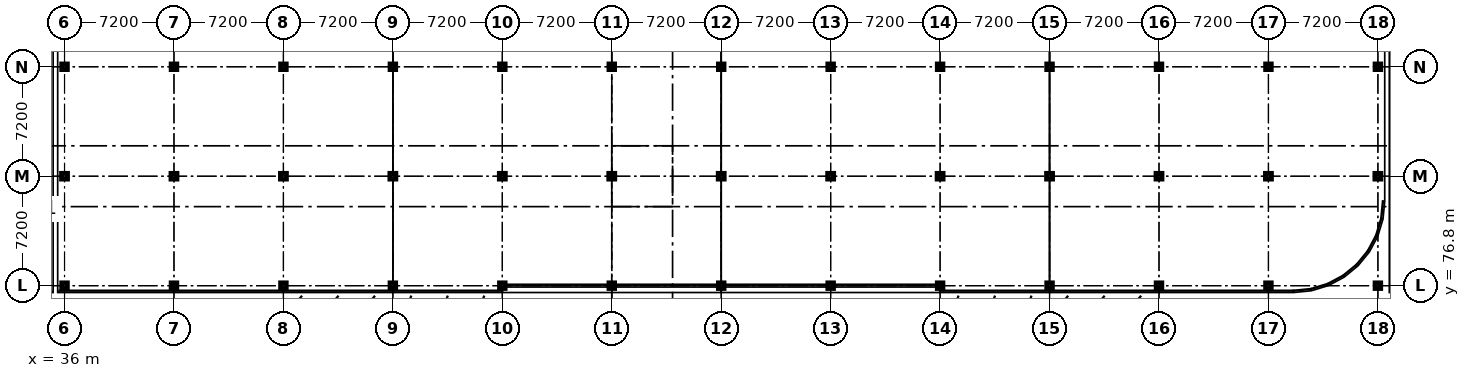
"""IFC4 building model, lengths in metres.
Left out: names, types, materials, properties, quantities, classifications, styles, units other than length and angle.
Written with IfcOpenShell. Run it as: python <this file> out.ifc"""

import sys

from ifc_helpers import new_model, si_unit, direction, frame, origin, origin_2d, place, context, subcontext, project, spatial, i_section, extrude, element, save


model = new_model("IFC4")
c1 = context("Model", 3, precision=1e-05, world=origin(), true_north=direction((0.0, 1.0)))
c2 = subcontext(c1, "Body", "Model", "MODEL_VIEW")
j1 = project(units=[si_unit("LENGTHUNIT", "METRE"), si_unit("PLANEANGLEUNIT", "RADIAN")], contexts=[c1])
p1 = place(None, origin())
s1 = spatial("IfcSite", under=j1, at=p1, CompositionType="ELEMENT")
p2 = place(p1, origin())
s2 = spatial("IfcBuilding", under=s1, at=p2, CompositionType="ELEMENT")
p3 = place(p2, frame((0.0, 0.0, 9.3)))
s3 = spatial("IfcBuildingStorey", under=s2, at=p3, CompositionType="ELEMENT", Elevation=9.3)
p4 = place(p3, frame((36.0, 76.8, 0.0), z_axis=(0.0, 0.0, 1.0), x_axis=(1.0, 0.0, 0.0)))
e1 = element("IfcColumn", 1, at=p4, inside=s3, PredefinedType="COLUMN", context=c2, shape_type="SweptSolid", body=[
    extrude(i_section(OverallWidth=0.373, OverallDepth=0.373, WebThickness=0.016, FlangeThickness=0.026, FilletRadius=0.015, at=origin_2d()), origin(), (0.0, 0.0, 1.0), 3.9),
])
p5 = place(p3, frame((36.0, 84.0, 0.0), z_axis=(0.0, 0.0, 1.0), x_axis=(1.0, 0.0, 0.0)))
e2 = element("IfcColumn", 2, at=p5, inside=s3, PredefinedType="COLUMN", context=c2, shape_type="SweptSolid", body=[
    extrude(i_section(OverallWidth=0.396, OverallDepth=0.381, WebThickness=0.019, FlangeThickness=0.03, FilletRadius=0.015, at=origin_2d()), origin(), (0.0, 0.0, 1.0), 3.9),
])
for number, where, z_axis, x_axis in (
    (3, (36.0, 91.2, 0.0), (0.0, 0.0, 1.0), (1.0, 0.0, 0.0)),
    (4, (43.2, 76.8, 0.0), (0.0, 0.0, 1.0), (1.0, 0.0, 0.0)),
):
    element("IfcColumn", number, at=place(p3, frame(where, z_axis=z_axis, x_axis=x_axis)), inside=s3, PredefinedType="COLUMN", context=c2, shape_type="SweptSolid", body=[
        extrude(i_section(OverallWidth=0.373, OverallDepth=0.373, WebThickness=0.016, FlangeThickness=0.026, FilletRadius=0.015, at=origin_2d()), origin(), (0.0, 0.0, 1.0), 3.9),
    ])
p6 = place(p3, frame((43.2, 84.0, 0.0), z_axis=(0.0, 0.0, 1.0), x_axis=(1.0, 0.0, 0.0)))
e5 = element("IfcColumn", 5, at=p6, inside=s3, PredefinedType="COLUMN", context=c2, shape_type="SweptSolid", body=[
    extrude(i_section(OverallWidth=0.396, OverallDepth=0.381, WebThickness=0.019, FlangeThickness=0.03, FilletRadius=0.015, at=origin_2d()), origin(), (0.0, 0.0, 1.0), 3.9),
])
for number, where, z_axis, x_axis in (
    (6, (43.2, 91.2, 0.0), (0.0, 0.0, 1.0), (1.0, 0.0, 0.0)),
    (7, (50.4, 76.8, 0.0), (0.0, 0.0, 1.0), (1.0, 0.0, 0.0)),
):
    element("IfcColumn", number, at=place(p3, frame(where, z_axis=z_axis, x_axis=x_axis)), inside=s3, PredefinedType="COLUMN", context=c2, shape_type="SweptSolid", body=[
        extrude(i_section(OverallWidth=0.373, OverallDepth=0.373, WebThickness=0.016, FlangeThickness=0.026, FilletRadius=0.015, at=origin_2d()), origin(), (0.0, 0.0, 1.0), 3.9),
    ])
p7 = place(p3, frame((50.4, 84.0, 0.0), z_axis=(0.0, 0.0, 1.0), x_axis=(1.0, 0.0, 0.0)))
e8 = element("IfcColumn", 8, at=p7, inside=s3, PredefinedType="COLUMN", context=c2, shape_type="SweptSolid", body=[
    extrude(i_section(OverallWidth=0.396, OverallDepth=0.381, WebThickness=0.019, FlangeThickness=0.03, FilletRadius=0.015, at=origin_2d()), origin(), (0.0, 0.0, 1.0), 3.9),
])
for number, where, z_axis, x_axis in (
    (9, (50.4, 91.2, 0.0), (0.0, 0.0, 1.0), (1.0, 0.0, 0.0)),
    (10, (57.6, 76.8, 0.0), (0.0, 0.0, 1.0), (1.0, 0.0, 0.0)),
):
    element("IfcColumn", number, at=place(p3, frame(where, z_axis=z_axis, x_axis=x_axis)), inside=s3, PredefinedType="COLUMN", context=c2, shape_type="SweptSolid", body=[
        extrude(i_section(OverallWidth=0.373, OverallDepth=0.373, WebThickness=0.016, FlangeThickness=0.026, FilletRadius=0.015, at=origin_2d()), origin(), (0.0, 0.0, 1.0), 3.9),
    ])
p8 = place(p3, frame((57.6, 84.0, 0.0), z_axis=(0.0, 0.0, 1.0), x_axis=(1.0, 0.0, 0.0)))
e11 = element("IfcColumn", 11, at=p8, inside=s3, PredefinedType="COLUMN", context=c2, shape_type="SweptSolid", body=[
    extrude(i_section(OverallWidth=0.396, OverallDepth=0.381, WebThickness=0.019, FlangeThickness=0.03, FilletRadius=0.015, at=origin_2d()), origin(), (0.0, 0.0, 1.0), 3.9),
])
for number, where, z_axis, x_axis in (
    (12, (57.6, 91.2, 0.0), (0.0, 0.0, 1.0), (1.0, 0.0, 0.0)),
    (13, (64.8, 76.8, 0.0), (0.0, 0.0, 1.0), (1.0, 0.0, 0.0)),
):
    element("IfcColumn", number, at=place(p3, frame(where, z_axis=z_axis, x_axis=x_axis)), inside=s3, PredefinedType="COLUMN", context=c2, shape_type="SweptSolid", body=[
        extrude(i_section(OverallWidth=0.373, OverallDepth=0.373, WebThickness=0.016, FlangeThickness=0.026, FilletRadius=0.015, at=origin_2d()), origin(), (0.0, 0.0, 1.0), 3.9),
    ])
p9 = place(p3, frame((64.8, 84.0, 0.0), z_axis=(0.0, 0.0, 1.0), x_axis=(1.0, 0.0, 0.0)))
e14 = element("IfcColumn", 14, at=p9, inside=s3, PredefinedType="COLUMN", context=c2, shape_type="SweptSolid", body=[
    extrude(i_section(OverallWidth=0.396, OverallDepth=0.381, WebThickness=0.019, FlangeThickness=0.03, FilletRadius=0.015, at=origin_2d()), origin(), (0.0, 0.0, 1.0), 3.9),
])
for number, where, z_axis, x_axis in (
    (15, (64.8, 91.2, 0.0), (0.0, 0.0, 1.0), (1.0, 0.0, 0.0)),
    (16, (72.0, 76.8, 0.0), (0.0, 0.0, 1.0), (1.0, 0.0, 0.0)),
):
    element("IfcColumn", number, at=place(p3, frame(where, z_axis=z_axis, x_axis=x_axis)), inside=s3, PredefinedType="COLUMN", context=c2, shape_type="SweptSolid", body=[
        extrude(i_section(OverallWidth=0.373, OverallDepth=0.373, WebThickness=0.016, FlangeThickness=0.026, FilletRadius=0.015, at=origin_2d()), origin(), (0.0, 0.0, 1.0), 3.9),
    ])
p10 = place(p3, frame((72.0, 84.0, 0.0), z_axis=(0.0, 0.0, 1.0), x_axis=(1.0, 0.0, 0.0)))
e17 = element("IfcColumn", 17, at=p10, inside=s3, PredefinedType="COLUMN", context=c2, shape_type="SweptSolid", body=[
    extrude(i_section(OverallWidth=0.396, OverallDepth=0.381, WebThickness=0.019, FlangeThickness=0.03, FilletRadius=0.015, at=origin_2d()), origin(), (0.0, 0.0, 1.0), 3.9),
])
for number, where, z_axis, x_axis in (
    (18, (72.0, 91.2, 0.0), (0.0, 0.0, 1.0), (1.0, 0.0, 0.0)),
    (19, (79.2, 76.8, 0.0), (0.0, 0.0, 1.0), (1.0, 0.0, 0.0)),
):
    element("IfcColumn", number, at=place(p3, frame(where, z_axis=z_axis, x_axis=x_axis)), inside=s3, PredefinedType="COLUMN", context=c2, shape_type="SweptSolid", body=[
        extrude(i_section(OverallWidth=0.373, OverallDepth=0.373, WebThickness=0.016, FlangeThickness=0.026, FilletRadius=0.015, at=origin_2d()), origin(), (0.0, 0.0, 1.0), 3.9),
    ])
p11 = place(p3, frame((79.2, 84.0, 0.0), z_axis=(0.0, 0.0, 1.0), x_axis=(1.0, 0.0, 0.0)))
e20 = element("IfcColumn", 20, at=p11, inside=s3, PredefinedType="COLUMN", context=c2, shape_type="SweptSolid", body=[
    extrude(i_section(OverallWidth=0.396, OverallDepth=0.381, WebThickness=0.019, FlangeThickness=0.03, FilletRadius=0.015, at=origin_2d()), origin(), (0.0, 0.0, 1.0), 3.9),
])
for number, where, z_axis, x_axis in (
    (21, (79.2, 91.2, 0.0), (0.0, 0.0, 1.0), (1.0, 0.0, 0.0)),
    (22, (86.4, 76.8, 0.0), (0.0, 0.0, 1.0), (1.0, 0.0, 0.0)),
):
    element("IfcColumn", number, at=place(p3, frame(where, z_axis=z_axis, x_axis=x_axis)), inside=s3, PredefinedType="COLUMN", context=c2, shape_type="SweptSolid", body=[
        extrude(i_section(OverallWidth=0.373, OverallDepth=0.373, WebThickness=0.016, FlangeThickness=0.026, FilletRadius=0.015, at=origin_2d()), origin(), (0.0, 0.0, 1.0), 3.9),
    ])
p12 = place(p3, frame((86.4, 84.0, 0.0), z_axis=(0.0, 0.0, 1.0), x_axis=(1.0, 0.0, 0.0)))
e23 = element("IfcColumn", 23, at=p12, inside=s3, PredefinedType="COLUMN", context=c2, shape_type="SweptSolid", body=[
    extrude(i_section(OverallWidth=0.396, OverallDepth=0.381, WebThickness=0.019, FlangeThickness=0.03, FilletRadius=0.015, at=origin_2d()), origin(), (0.0, 0.0, 1.0), 3.9),
])
for number, where, z_axis, x_axis in (
    (24, (86.4, 91.2, 0.0), (0.0, 0.0, 1.0), (1.0, 0.0, 0.0)),
    (25, (93.6, 76.8, 0.0), (0.0, 0.0, 1.0), (1.0, 0.0, 0.0)),
):
    element("IfcColumn", number, at=place(p3, frame(where, z_axis=z_axis, x_axis=x_axis)), inside=s3, PredefinedType="COLUMN", context=c2, shape_type="SweptSolid", body=[
        extrude(i_section(OverallWidth=0.373, OverallDepth=0.373, WebThickness=0.016, FlangeThickness=0.026, FilletRadius=0.015, at=origin_2d()), origin(), (0.0, 0.0, 1.0), 3.9),
    ])
p13 = place(p3, frame((93.6, 84.0, 0.0), z_axis=(0.0, 0.0, 1.0), x_axis=(1.0, 0.0, 0.0)))
e26 = element("IfcColumn", 26, at=p13, inside=s3, PredefinedType="COLUMN", context=c2, shape_type="SweptSolid", body=[
    extrude(i_section(OverallWidth=0.396, OverallDepth=0.381, WebThickness=0.019, FlangeThickness=0.03, FilletRadius=0.015, at=origin_2d()), origin(), (0.0, 0.0, 1.0), 3.9),
])
for number, where, z_axis, x_axis in (
    (27, (93.6, 91.2, 0.0), (0.0, 0.0, 1.0), (1.0, 0.0, 0.0)),
    (28, (100.8, 76.8, 0.0), (0.0, 0.0, 1.0), (1.0, 0.0, 0.0)),
):
    element("IfcColumn", number, at=place(p3, frame(where, z_axis=z_axis, x_axis=x_axis)), inside=s3, PredefinedType="COLUMN", context=c2, shape_type="SweptSolid", body=[
        extrude(i_section(OverallWidth=0.373, OverallDepth=0.373, WebThickness=0.016, FlangeThickness=0.026, FilletRadius=0.015, at=origin_2d()), origin(), (0.0, 0.0, 1.0), 3.9),
    ])
p14 = place(p3, frame((100.8, 84.0, 0.0), z_axis=(0.0, 0.0, 1.0), x_axis=(1.0, 0.0, 0.0)))
e29 = element("IfcColumn", 29, at=p14, inside=s3, PredefinedType="COLUMN", context=c2, shape_type="SweptSolid", body=[
    extrude(i_section(OverallWidth=0.396, OverallDepth=0.381, WebThickness=0.019, FlangeThickness=0.03, FilletRadius=0.015, at=origin_2d()), origin(), (0.0, 0.0, 1.0), 3.9),
])
for number, where, z_axis, x_axis in (
    (30, (100.8, 91.2, 0.0), (0.0, 0.0, 1.0), (1.0, 0.0, 0.0)),
    (31, (108.0, 76.8, 0.0), (0.0, 0.0, 1.0), (1.0, 0.0, 0.0)),
):
    element("IfcColumn", number, at=place(p3, frame(where, z_axis=z_axis, x_axis=x_axis)), inside=s3, PredefinedType="COLUMN", context=c2, shape_type="SweptSolid", body=[
        extrude(i_section(OverallWidth=0.373, OverallDepth=0.373, WebThickness=0.016, FlangeThickness=0.026, FilletRadius=0.015, at=origin_2d()), origin(), (0.0, 0.0, 1.0), 3.9),
    ])
p15 = place(p3, frame((108.0, 84.0, 0.0), z_axis=(0.0, 0.0, 1.0), x_axis=(1.0, 0.0, 0.0)))
e32 = element("IfcColumn", 32, at=p15, inside=s3, PredefinedType="COLUMN", context=c2, shape_type="SweptSolid", body=[
    extrude(i_section(OverallWidth=0.396, OverallDepth=0.381, WebThickness=0.019, FlangeThickness=0.03, FilletRadius=0.015, at=origin_2d()), origin(), (0.0, 0.0, 1.0), 3.9),
])
for number, where, z_axis, x_axis in (
    (33, (108.0, 91.2, 0.0), (0.0, 0.0, 1.0), (1.0, 0.0, 0.0)),
    (34, (115.2, 76.8, 0.0), (0.0, 0.0, 1.0), (1.0, 0.0, 0.0)),
):
    element("IfcColumn", number, at=place(p3, frame(where, z_axis=z_axis, x_axis=x_axis)), inside=s3, PredefinedType="COLUMN", context=c2, shape_type="SweptSolid", body=[
        extrude(i_section(OverallWidth=0.373, OverallDepth=0.373, WebThickness=0.016, FlangeThickness=0.026, FilletRadius=0.015, at=origin_2d()), origin(), (0.0, 0.0, 1.0), 3.9),
    ])
p16 = place(p3, frame((115.2, 84.0, 0.0), z_axis=(0.0, 0.0, 1.0), x_axis=(1.0, 0.0, 0.0)))
e35 = element("IfcColumn", 35, at=p16, inside=s3, PredefinedType="COLUMN", context=c2, shape_type="SweptSolid", body=[
    extrude(i_section(OverallWidth=0.396, OverallDepth=0.381, WebThickness=0.019, FlangeThickness=0.03, FilletRadius=0.015, at=origin_2d()), origin(), (0.0, 0.0, 1.0), 3.9),
])
for number, where, z_axis, x_axis in (
    (36, (115.2, 91.2, 0.0), (0.0, 0.0, 1.0), (1.0, 0.0, 0.0)),
    (37, (122.4, 76.8, 0.0), (0.0, 0.0, 1.0), (1.0, 0.0, 0.0)),
):
    element("IfcColumn", number, at=place(p3, frame(where, z_axis=z_axis, x_axis=x_axis)), inside=s3, PredefinedType="COLUMN", context=c2, shape_type="SweptSolid", body=[
        extrude(i_section(OverallWidth=0.373, OverallDepth=0.373, WebThickness=0.016, FlangeThickness=0.026, FilletRadius=0.015, at=origin_2d()), origin(), (0.0, 0.0, 1.0), 3.9),
    ])
p17 = place(p3, frame((122.4, 84.0, 0.0), z_axis=(0.0, 0.0, 1.0), x_axis=(1.0, 0.0, 0.0)))
e38 = element("IfcColumn", 38, at=p17, inside=s3, PredefinedType="COLUMN", context=c2, shape_type="SweptSolid", body=[
    extrude(i_section(OverallWidth=0.396, OverallDepth=0.381, WebThickness=0.019, FlangeThickness=0.03, FilletRadius=0.015, at=origin_2d()), origin(), (0.0, 0.0, 1.0), 3.9),
])
p18 = place(p3, frame((122.4, 91.2, 0.0), z_axis=(0.0, 0.0, 1.0), x_axis=(1.0, 0.0, 0.0)))
e39 = element("IfcColumn", 39, at=p18, inside=s3, PredefinedType="COLUMN", context=c2, shape_type="SweptSolid", body=[
    extrude(i_section(OverallWidth=0.373, OverallDepth=0.373, WebThickness=0.016, FlangeThickness=0.026, FilletRadius=0.015, at=origin_2d()), origin(), (0.0, 0.0, 1.0), 3.9),
])
save(model, sys.argv[1])
